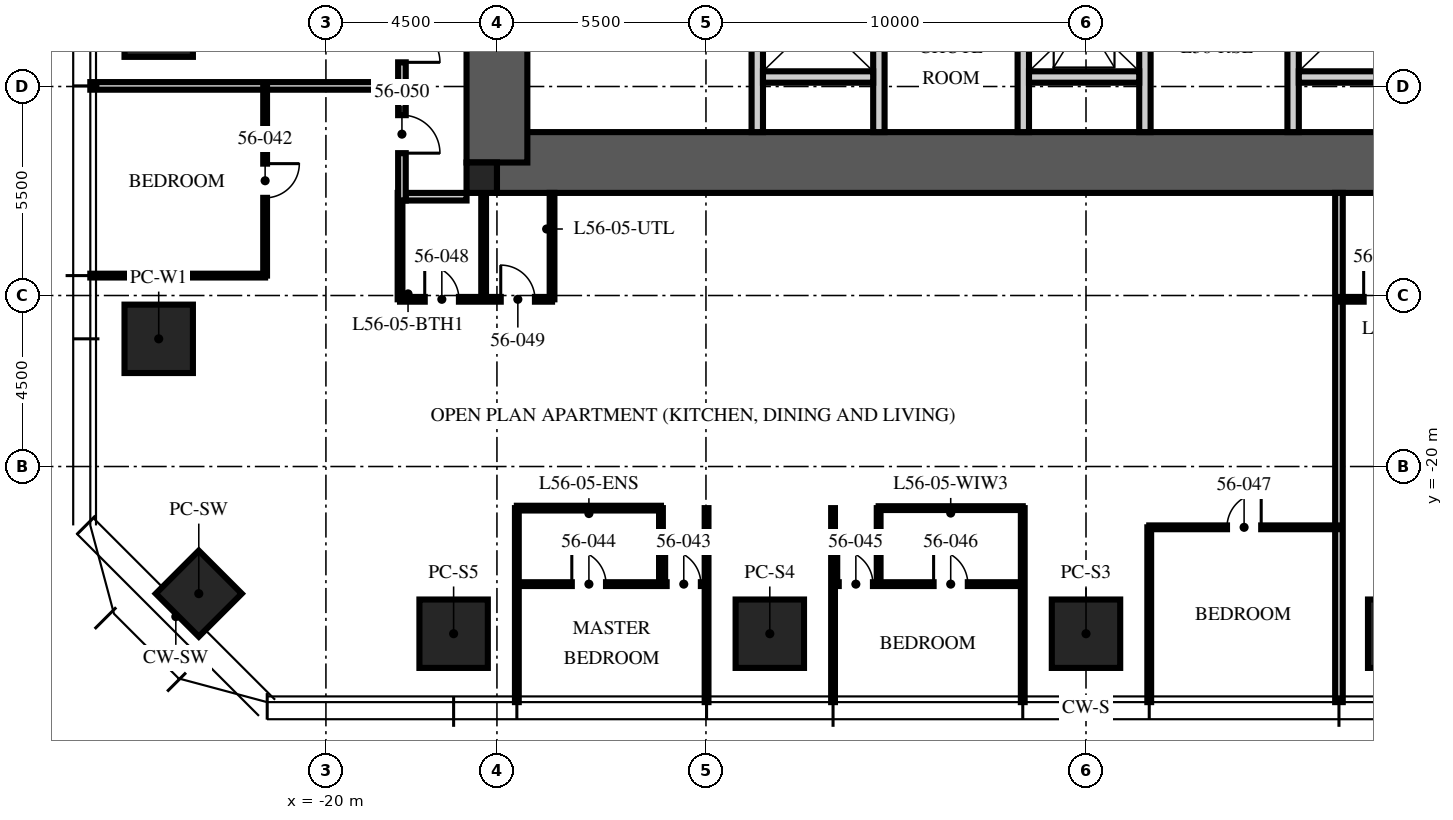
"""IFC4 building model, lengths in metres.
Left out: names, types, materials, properties, quantities, classifications, styles, units other than length and angle.
Written with IfcOpenShell. Run it as: python <this file> out.ifc"""

import sys

from ifc_helpers import new_model, si_unit, direction, frame, frame_2d, origin, origin_2d, place, context, subcontext, project, spatial, rectangle, extrude, element, fill, save


model = new_model("IFC4")
c1 = context("Model", 3, precision=1e-05, world=origin(), true_north=direction((0.0, 1.0)))
c2 = subcontext(c1, "Body", "Model", "MODEL_VIEW")
j1 = project(units=[si_unit("LENGTHUNIT", "METRE"), si_unit("PLANEANGLEUNIT", "RADIAN")], contexts=[c1])
p1 = place(None, origin())
s1 = spatial("IfcSite", under=j1, at=p1, CompositionType="ELEMENT")
p2 = place(p1, origin())
s2 = spatial("IfcBuilding", under=s1, at=p2, CompositionType="ELEMENT")
p3 = place(p2, frame((0.0, 0.0, 225.75)))
s3 = spatial("IfcBuildingStorey", under=s2, at=p3, CompositionType="ELEMENT", Elevation=225.75)
p4 = place(p3, frame((-15.5, -12.0, -0.25), z_axis=(0.0, 0.0, 1.0), x_axis=(1.0, 0.0, 0.0)))
e1 = element("IfcWall", 1, at=p4, inside=s3, PredefinedType="SHEAR", context=c2, shape_type="SweptSolid", body=[
    extrude(rectangle(XDim=31.0, YDim=1.6, at=frame_2d((15.5, 0.0))), origin(), (0.0, 0.0, 1.0), 3.75),
])
p5 = place(p3, frame((-15.5, -12.0, -0.25), z_axis=(0.0, 0.0, 1.0), x_axis=(0.0, 1.0, 0.0)))
e2 = element("IfcWall", 2, at=p5, inside=s3, PredefinedType="SHEAR", context=c2, shape_type="SweptSolid", body=[
    extrude(rectangle(XDim=24.0, YDim=1.6, at=frame_2d((12.0, 0.0))), origin(), (0.0, 0.0, 1.0), 3.75),
])
p6 = place(p5, frame((3.2, 0.0, 0.25)))
e3 = element("IfcOpeningElement", 3, at=p6, cuts=e2, PredefinedType="OPENING", context=c2, shape_type="SweptSolid", body=[
    extrude(rectangle(XDim=1.2, YDim=2.1, at=frame_2d((0.6, 1.05))), frame((0.0, 0.81, 0.0), z_axis=(0.0, -1.0, 0.0), x_axis=(1.0, 0.0, 0.0)), (0.0, 0.0, 1.0), 1.62),
])
p7 = place(p5, frame((19.3, 0.0, 0.25)))
e4 = element("IfcOpeningElement", 4, at=p7, cuts=e2, PredefinedType="OPENING", context=c2, shape_type="SweptSolid", body=[
    extrude(rectangle(XDim=1.8, YDim=2.1, at=frame_2d((0.9, 1.05))), frame((0.0, 0.81, 0.0), z_axis=(0.0, -1.0, 0.0), x_axis=(1.0, 0.0, 0.0)), (0.0, 0.0, 1.0), 1.62),
])
p8 = place(p3, frame((-15.9, -12.4, -0.25), z_axis=(0.0, 0.0, 1.0), x_axis=(1.0, 0.0, 0.0)))
e5 = element("IfcColumn", 5, at=p8, inside=s3, PredefinedType="COLUMN", context=c2, shape_type="SweptSolid", body=[
    extrude(rectangle(XDim=0.8, YDim=0.8, at=origin_2d()), origin(), (0.0, 0.0, 1.0), 3.75),
])
for number, where, z_axis, x_axis in (
    (6, (8.32, -24.4, 0.0), (0.0, 0.0, 1.0), (1.0, 0.0, 0.0)),
    (7, (0.0, -24.4, 0.0), (0.0, 0.0, 1.0), (1.0, 0.0, 0.0)),
    (8, (-8.32, -24.4, 0.0), (0.0, 0.0, 1.0), (1.0, 0.0, 0.0)),
    (9, (-16.64, -24.4, 0.0), (0.0, 0.0, 1.0), (1.0, 0.0, 0.0)),
    (10, (-24.4, -16.64, 0.0), (0.0, 0.0, 1.0), (0.0, 1.0, 0.0)),
    (11, (-24.4, -8.32, 0.0), (0.0, 0.0, 1.0), (0.0, 1.0, 0.0)),
):
    element("IfcColumn", number, at=place(p3, frame(where, z_axis=z_axis, x_axis=x_axis)), inside=s3, PredefinedType="COLUMN", context=c2, shape_type="SweptSolid", body=[
        extrude(rectangle(XDim=1.8, YDim=1.8, at=origin_2d()), origin(), (0.0, 0.0, 1.0), 3.75),
    ])
p9 = place(p3, frame((-23.346, -23.346, 0.0), z_axis=(0.0, 0.0, 1.0), x_axis=(0.707106781187, -0.707106781187, 0.0)))
e12 = element("IfcColumn", 12, at=p9, inside=s3, PredefinedType="COLUMN", context=c2, shape_type="SweptSolid", body=[
    extrude(rectangle(XDim=1.6, YDim=1.6, at=origin_2d()), origin(), (0.0, 0.0, 1.0), 3.75),
])
p10 = place(p3, frame((-8.65, -11.2, 0.0), z_axis=(0.0, 0.0, 1.0), x_axis=(0.0, 1.0, 0.0)))
e13 = element("IfcWall", 13, at=p10, inside=s3, PredefinedType="PARTITIONING", context=c2, shape_type="SweptSolid", body=[
    extrude(rectangle(XDim=6.3, YDim=0.3, at=frame_2d((3.15, 0.0))), origin(), (0.0, 0.0, 1.0), 3.5),
])
p11 = place(p10, frame((2.45, 0.0, 0.0)))
e14 = element("IfcOpeningElement", 14, at=p11, cuts=e13, PredefinedType="OPENING", context=c2, shape_type="SweptSolid", body=[
    extrude(rectangle(XDim=1.1, YDim=2.1, at=frame_2d((0.55, 1.05))), frame((0.0, 0.16, 0.0), z_axis=(0.0, -1.0, 0.0), x_axis=(1.0, 0.0, 0.0)), (0.0, 0.0, 1.0), 0.32),
])
for number, where, z_axis, x_axis in (
    (15, (-5.45, -11.2, 0.0), (0.0, 0.0, 1.0), (0.0, 1.0, 0.0)),
    (16, (-1.65, -11.2, 0.0), (0.0, 0.0, 1.0), (0.0, 1.0, 0.0)),
    (17, (1.55, -11.2, 0.0), (0.0, 0.0, 1.0), (0.0, 1.0, 0.0)),
    (18, (5.45, -11.2, 0.0), (0.0, 0.0, 1.0), (0.0, 1.0, 0.0)),
):
    element("IfcWall", number, at=place(p3, frame(where, z_axis=z_axis, x_axis=x_axis)), inside=s3, PredefinedType="PARTITIONING", context=c2, shape_type="SweptSolid", body=[
        extrude(rectangle(XDim=4.4, YDim=0.3, at=frame_2d((2.2, 0.0))), origin(), (0.0, 0.0, 1.0), 3.5),
    ])
for number, where, z_axis, x_axis in (
    (19, (-8.5, -9.75, 0.0), (0.0, 0.0, 1.0), (1.0, 0.0, 0.0)),
    (20, (-1.5, -9.75, 0.0), (0.0, 0.0, 1.0), (1.0, 0.0, 0.0)),
    (21, (5.6, -9.75, 0.0), (0.0, 0.0, 1.0), (1.0, 0.0, 0.0)),
):
    element("IfcWall", number, at=place(p3, frame(where, z_axis=z_axis, x_axis=x_axis)), inside=s3, PredefinedType="PARTITIONING", context=c2, shape_type="SweptSolid", body=[
        extrude(rectangle(XDim=2.9, YDim=0.3, at=frame_2d((1.45, 0.0))), origin(), (0.0, 0.0, 1.0), 3.5),
    ])
p12 = place(p3, frame((-16.3, -12.9, 0.0), z_axis=(0.0, 0.0, 1.0), x_axis=(-1.0, 0.0, 0.0)))
e22 = element("IfcWall", 22, at=p12, inside=s3, PredefinedType="PARTITIONING", context=c2, shape_type="SweptSolid", body=[
    extrude(rectangle(XDim=1.6, YDim=0.2, at=frame_2d((0.8, 0.0))), origin(), (0.0, 0.0, 1.0), 2.3),
])
p13 = place(p3, frame((-18.1, -9.984, 0.0), z_axis=(0.0, 0.0, 1.0), x_axis=(-1.0, 0.0, 0.0)))
e23 = element("IfcWall", 23, at=p13, inside=s3, PredefinedType="PARTITIONING", context=c2, shape_type="SweptSolid", body=[
    extrude(rectangle(XDim=8.1, YDim=0.2, at=frame_2d((4.05, 0.0))), origin(), (0.0, 0.0, 1.0), 2.91),
])
p14 = place(p3, frame((-21.6, -14.976, 0.0), z_axis=(0.0, 0.0, 1.0), x_axis=(-1.0, 0.0, 0.0)))
e24 = element("IfcWall", 24, at=p14, inside=s3, PredefinedType="PARTITIONING", context=c2, shape_type="SweptSolid", body=[
    extrude(rectangle(XDim=4.6, YDim=0.1, at=frame_2d((2.3, 0.0))), origin(), (0.0, 0.0, 1.0), 2.91),
])
for number, where, z_axis, x_axis in (
    (25, (-14.976, -21.095, 0.0), (0.0, 0.0, 1.0), (0.0, -1.0, 0.0)),
    (26, (-9.984, -21.095, 0.0), (0.0, 0.0, 1.0), (0.0, -1.0, 0.0)),
    (27, (-6.656, -21.095, 0.0), (0.0, 0.0, 1.0), (0.0, -1.0, 0.0)),
    (28, (-1.664, -21.095, 0.0), (0.0, 0.0, 1.0), (0.0, -1.0, 0.0)),
):
    element("IfcWall", number, at=place(p3, frame(where, z_axis=z_axis, x_axis=x_axis)), inside=s3, PredefinedType="PARTITIONING", context=c2, shape_type="SweptSolid", body=[
        extrude(rectangle(XDim=5.105, YDim=0.1, at=frame_2d((2.552, 0.0))), origin(), (0.0, 0.0, 1.0), 2.91),
    ])
p15 = place(p3, frame((1.664, -21.6, 0.0), z_axis=(0.0, 0.0, 1.0), x_axis=(0.0, -1.0, 0.0)))
e29 = element("IfcWall", 29, at=p15, inside=s3, PredefinedType="PARTITIONING", context=c2, shape_type="SweptSolid", body=[
    extrude(rectangle(XDim=4.6, YDim=0.1, at=frame_2d((2.3, 0.0))), origin(), (0.0, 0.0, 1.0), 2.91),
])
p16 = place(p3, frame((6.656, -12.8, 0.0), z_axis=(0.0, 0.0, 1.0), x_axis=(0.0, -1.0, 0.0)))
e30 = element("IfcWall", 30, at=p16, inside=s3, PredefinedType="PARTITIONING", context=c2, shape_type="SweptSolid", body=[
    extrude(rectangle(XDim=13.4, YDim=0.2, at=frame_2d((6.7, 0.0))), origin(), (0.0, 0.0, 1.0), 2.91),
])
p17 = place(p3, frame((-21.6, -9.984, 0.0), z_axis=(0.0, 0.0, 1.0), x_axis=(0.0, -1.0, 0.0)))
e31 = element("IfcWall", 31, at=p17, inside=s3, PredefinedType="PARTITIONING", context=c2, shape_type="SweptSolid", body=[
    extrude(rectangle(XDim=4.992, YDim=0.1, at=frame_2d((2.496, 0.0))), origin(), (0.0, 0.0, 1.0), 2.81),
])
p18 = place(p17, frame((2.046, 0.0, 0.0)))
e32 = element("IfcOpeningElement", 32, at=p18, cuts=e31, PredefinedType="OPENING", context=c2, shape_type="SweptSolid", body=[
    extrude(rectangle(XDim=0.9, YDim=2.1, at=frame_2d((0.45, 1.05))), frame((0.0, 0.06, 0.0), z_axis=(0.0, -1.0, 0.0), x_axis=(1.0, 0.0, 0.0)), (0.0, 0.0, 1.0), 0.12),
])
p19 = place(p3, frame((-14.976, -23.095, 0.0), z_axis=(0.0, 0.0, 1.0), x_axis=(1.0, 0.0, 0.0)))
e33 = element("IfcWall", 33, at=p19, inside=s3, PredefinedType="PARTITIONING", context=c2, shape_type="SweptSolid", body=[
    extrude(rectangle(XDim=4.992, YDim=0.1, at=frame_2d((2.496, 0.0))), origin(), (0.0, 0.0, 1.0), 2.81),
])
p20 = place(p19, frame((3.942, 0.0, 0.0)))
e34 = element("IfcOpeningElement", 34, at=p20, cuts=e33, PredefinedType="OPENING", context=c2, shape_type="SweptSolid", body=[
    extrude(rectangle(XDim=0.9, YDim=2.1, at=frame_2d((0.45, 1.05))), frame((0.0, 0.06, 0.0), z_axis=(0.0, -1.0, 0.0), x_axis=(1.0, 0.0, 0.0)), (0.0, 0.0, 1.0), 0.12),
])
p21 = place(p19, frame((1.446, 0.0, 0.0)))
e35 = element("IfcOpeningElement", 35, at=p21, cuts=e33, PredefinedType="OPENING", context=c2, shape_type="SweptSolid", body=[
    extrude(rectangle(XDim=0.9, YDim=2.1, at=frame_2d((0.45, 1.05))), frame((0.0, 0.06, 0.0), z_axis=(0.0, -1.0, 0.0), x_axis=(1.0, 0.0, 0.0)), (0.0, 0.0, 1.0), 0.12),
])
p22 = place(p3, frame((-11.184, -21.095, 0.0), z_axis=(0.0, 0.0, 1.0), x_axis=(0.0, -1.0, 0.0)))
e36 = element("IfcWall", 36, at=p22, inside=s3, PredefinedType="PARTITIONING", context=c2, shape_type="SweptSolid", body=[
    extrude(rectangle(XDim=2.0, YDim=0.1, at=frame_2d((1.0, 0.0))), origin(), (0.0, 0.0, 1.0), 3.5),
])
p23 = place(p3, frame((-14.976, -21.095, 0.0), z_axis=(0.0, 0.0, 1.0), x_axis=(1.0, 0.0, 0.0)))
e37 = element("IfcWall", 37, at=p23, inside=s3, PredefinedType="PARTITIONING", context=c2, shape_type="SweptSolid", body=[
    extrude(rectangle(XDim=3.792, YDim=0.125, at=frame_2d((1.896, 0.0))), origin(), (0.0, 0.0, 1.0), 2.81),
])
p24 = place(p3, frame((-6.656, -23.095, 0.0), z_axis=(0.0, 0.0, 1.0), x_axis=(1.0, 0.0, 0.0)))
e38 = element("IfcWall", 38, at=p24, inside=s3, PredefinedType="PARTITIONING", context=c2, shape_type="SweptSolid", body=[
    extrude(rectangle(XDim=4.992, YDim=0.1, at=frame_2d((2.496, 0.0))), origin(), (0.0, 0.0, 1.0), 2.81),
])
p25 = place(p24, frame((0.15, 0.0, 0.0)))
e39 = element("IfcOpeningElement", 39, at=p25, cuts=e38, PredefinedType="OPENING", context=c2, shape_type="SweptSolid", body=[
    extrude(rectangle(XDim=0.9, YDim=2.1, at=frame_2d((0.45, 1.05))), frame((0.0, 0.06, 0.0), z_axis=(0.0, -1.0, 0.0), x_axis=(1.0, 0.0, 0.0)), (0.0, 0.0, 1.0), 0.12),
])
p26 = place(p24, frame((2.646, 0.0, 0.0)))
e40 = element("IfcOpeningElement", 40, at=p26, cuts=e38, PredefinedType="OPENING", context=c2, shape_type="SweptSolid", body=[
    extrude(rectangle(XDim=0.9, YDim=2.1, at=frame_2d((0.45, 1.05))), frame((0.0, 0.06, 0.0), z_axis=(0.0, -1.0, 0.0), x_axis=(1.0, 0.0, 0.0)), (0.0, 0.0, 1.0), 0.12),
])
p27 = place(p3, frame((-5.456, -21.095, 0.0), z_axis=(0.0, 0.0, 1.0), x_axis=(0.0, -1.0, 0.0)))
e41 = element("IfcWall", 41, at=p27, inside=s3, PredefinedType="PARTITIONING", context=c2, shape_type="SweptSolid", body=[
    extrude(rectangle(XDim=2.0, YDim=0.1, at=frame_2d((1.0, 0.0))), origin(), (0.0, 0.0, 1.0), 3.5),
])
p28 = place(p3, frame((-5.456, -21.095, 0.0), z_axis=(0.0, 0.0, 1.0), x_axis=(1.0, 0.0, 0.0)))
e42 = element("IfcWall", 42, at=p28, inside=s3, PredefinedType="PARTITIONING", context=c2, shape_type="SweptSolid", body=[
    extrude(rectangle(XDim=3.792, YDim=0.1, at=frame_2d((1.896, 0.0))), origin(), (0.0, 0.0, 1.0), 2.81),
])
p29 = place(p3, frame((1.664, -21.6, 0.0), z_axis=(0.0, 0.0, 1.0), x_axis=(1.0, 0.0, 0.0)))
e43 = element("IfcWall", 43, at=p29, inside=s3, PredefinedType="PARTITIONING", context=c2, shape_type="SweptSolid", body=[
    extrude(rectangle(XDim=4.992, YDim=0.1, at=frame_2d((2.496, 0.0))), origin(), (0.0, 0.0, 1.0), 2.81),
])
p30 = place(p29, frame((2.046, 0.0, 0.0)))
e44 = element("IfcOpeningElement", 44, at=p30, cuts=e43, PredefinedType="OPENING", context=c2, shape_type="SweptSolid", body=[
    extrude(rectangle(XDim=0.9, YDim=2.1, at=frame_2d((0.45, 1.05))), frame((0.0, 0.06, 0.0), z_axis=(0.0, -1.0, 0.0), x_axis=(1.0, 0.0, 0.0)), (0.0, 0.0, 1.0), 0.12),
])
p31 = place(p3, frame((-18.05, -15.6, 0.0), z_axis=(0.0, 0.0, 1.0), x_axis=(1.0, 0.0, 0.0)))
e45 = element("IfcWall", 45, at=p31, inside=s3, PredefinedType="PARTITIONING", context=c2, shape_type="SweptSolid", body=[
    extrude(rectangle(XDim=4.0, YDim=0.125, at=frame_2d((2.0, 0.0))), origin(), (0.0, 0.0, 1.0), 2.3),
])
p32 = place(p31, frame((0.65, 0.0, 0.0)))
e46 = element("IfcOpeningElement", 46, at=p32, cuts=e45, PredefinedType="OPENING", context=c2, shape_type="SweptSolid", body=[
    extrude(rectangle(XDim=0.9, YDim=2.1, at=frame_2d((0.45, 1.05))), frame((0.0, 0.073, 0.0), z_axis=(0.0, -1.0, 0.0), x_axis=(1.0, 0.0, 0.0)), (0.0, 0.0, 1.0), 0.145),
])
p33 = place(p31, frame((2.65, 0.0, 0.0)))
e47 = element("IfcOpeningElement", 47, at=p33, cuts=e45, PredefinedType="OPENING", context=c2, shape_type="SweptSolid", body=[
    extrude(rectangle(XDim=0.9, YDim=2.1, at=frame_2d((0.45, 1.05))), frame((0.0, 0.073, 0.0), z_axis=(0.0, -1.0, 0.0), x_axis=(1.0, 0.0, 0.0)), (0.0, 0.0, 1.0), 0.145),
])
for number, where, z_axis, x_axis in (
    (48, (-18.05, -12.8, 0.0), (0.0, 0.0, 1.0), (0.0, -1.0, 0.0)),
    (49, (-15.85, -12.8, 0.0), (0.0, 0.0, 1.0), (0.0, -1.0, 0.0)),
):
    element("IfcWall", number, at=place(p3, frame(where, z_axis=z_axis, x_axis=x_axis)), inside=s3, PredefinedType="PARTITIONING", context=c2, shape_type="SweptSolid", body=[
        extrude(rectangle(XDim=2.8, YDim=0.125, at=frame_2d((1.4, 0.0))), origin(), (0.0, 0.0, 1.0), 2.3),
    ])
p34 = place(p3, frame((-14.05, -12.8, 0.0), z_axis=(0.0, 0.0, 1.0), x_axis=(0.0, -1.0, 0.0)))
e50 = element("IfcWall", 50, at=p34, inside=s3, PredefinedType="PARTITIONING", context=c2, shape_type="SweptSolid", body=[
    extrude(rectangle(XDim=2.8, YDim=0.125, at=frame_2d((1.4, 0.0))), origin(), (0.0, 0.0, 1.0), 3.5),
])
p35 = place(p3, frame((6.656, -15.6, 0.0), z_axis=(0.0, 0.0, 1.0), x_axis=(1.0, 0.0, 0.0)))
e51 = element("IfcWall", 51, at=p35, inside=s3, PredefinedType="PARTITIONING", context=c2, shape_type="SweptSolid", body=[
    extrude(rectangle(XDim=2.2, YDim=0.125, at=frame_2d((1.1, 0.0))), origin(), (0.0, 0.0, 1.0), 2.6),
])
p36 = place(p35, frame((0.65, 0.0, 0.0)))
e52 = element("IfcOpeningElement", 52, at=p36, cuts=e51, PredefinedType="OPENING", context=c2, shape_type="SweptSolid", body=[
    extrude(rectangle(XDim=0.9, YDim=2.1, at=frame_2d((0.45, 1.05))), frame((0.0, 0.073, 0.0), z_axis=(0.0, -1.0, 0.0), x_axis=(1.0, 0.0, 0.0)), (0.0, 0.0, 1.0), 0.145),
])
p37 = place(p3, frame((-18.0, 13.0, 0.0), z_axis=(0.0, 0.0, 1.0), x_axis=(0.0, -1.0, 0.0)))
e53 = element("IfcWall", 53, at=p37, inside=s3, PredefinedType="PARTITIONING", context=c2, shape_type="SweptSolid", body=[
    extrude(rectangle(XDim=26.0, YDim=0.2, at=frame_2d((13.0, 0.0))), origin(), (0.0, 0.0, 1.0), 2.6),
])
p38 = place(p37, frame((4.6, 0.0, 0.0)))
e54 = element("IfcOpeningElement", 54, at=p38, cuts=e53, PredefinedType="OPENING", context=c2, shape_type="SweptSolid", body=[
    extrude(rectangle(XDim=1.0, YDim=2.2, at=frame_2d((0.5, 1.1))), frame((0.0, 0.11, 0.0), z_axis=(0.0, -1.0, 0.0), x_axis=(1.0, 0.0, 0.0)), (0.0, 0.0, 1.0), 0.22),
])
p39 = place(p37, frame((21.364, 0.0, 0.0)))
e55 = element("IfcOpeningElement", 55, at=p39, cuts=e53, PredefinedType="OPENING", context=c2, shape_type="SweptSolid", body=[
    extrude(rectangle(XDim=1.0, YDim=2.2, at=frame_2d((0.5, 1.1))), frame((0.0, 0.11, 0.0), z_axis=(0.0, -1.0, 0.0), x_axis=(1.0, 0.0, 0.0)), (0.0, 0.0, 1.0), 0.22),
])
p40 = place(p37, frame((23.754, 0.0, 0.0)))
e56 = element("IfcOpeningElement", 56, at=p40, cuts=e53, PredefinedType="OPENING", context=c2, shape_type="SweptSolid", body=[
    extrude(rectangle(XDim=1.0, YDim=2.2, at=frame_2d((0.5, 1.1))), frame((0.0, 0.11, 0.0), z_axis=(0.0, -1.0, 0.0), x_axis=(1.0, 0.0, 0.0)), (0.0, 0.0, 1.0), 0.22),
])
p41 = place(p39, origin())
e57 = element("IfcDoor", 57, at=p41, inside=s3, OperationType="SINGLE_SWING_RIGHT", PredefinedType="DOOR", context=c2, shape_type="SweptSolid", body=[
    extrude(rectangle(XDim=1.0, YDim=2.2, at=frame_2d((0.5, 1.1))), frame((0.0, 0.025, 0.0), z_axis=(0.0, -1.0, 0.0), x_axis=(1.0, 0.0, 0.0)), (0.0, 0.0, 1.0), 0.05),
])
fill(e55, e57)
p42 = place(p18, origin())
e58 = element("IfcDoor", 58, at=p42, inside=s3, OperationType="SINGLE_SWING_LEFT", PredefinedType="DOOR", context=c2, shape_type="SweptSolid", body=[
    extrude(rectangle(XDim=0.9, YDim=2.1, at=frame_2d((0.45, 1.05))), frame((0.0, 0.025, 0.0), z_axis=(0.0, -1.0, 0.0), x_axis=(1.0, 0.0, 0.0)), (0.0, 0.0, 1.0), 0.05),
])
fill(e32, e58)
p43 = place(p20, origin())
e59 = element("IfcDoor", 59, at=p43, inside=s3, OperationType="SINGLE_SWING_LEFT", PredefinedType="DOOR", context=c2, shape_type="SweptSolid", body=[
    extrude(rectangle(XDim=0.9, YDim=2.1, at=frame_2d((0.45, 1.05))), frame((0.0, 0.025, 0.0), z_axis=(0.0, -1.0, 0.0), x_axis=(1.0, 0.0, 0.0)), (0.0, 0.0, 1.0), 0.05),
])
fill(e34, e59)
p44 = place(p21, origin())
e60 = element("IfcDoor", 60, at=p44, inside=s3, OperationType="SINGLE_SWING_LEFT", PredefinedType="DOOR", context=c2, shape_type="SweptSolid", body=[
    extrude(rectangle(XDim=0.9, YDim=2.1, at=frame_2d((0.45, 1.05))), frame((0.0, 0.025, 0.0), z_axis=(0.0, -1.0, 0.0), x_axis=(1.0, 0.0, 0.0)), (0.0, 0.0, 1.0), 0.05),
])
fill(e35, e60)
p45 = place(p25, origin())
e61 = element("IfcDoor", 61, at=p45, inside=s3, OperationType="SINGLE_SWING_LEFT", PredefinedType="DOOR", context=c2, shape_type="SweptSolid", body=[
    extrude(rectangle(XDim=0.9, YDim=2.1, at=frame_2d((0.45, 1.05))), frame((0.0, 0.025, 0.0), z_axis=(0.0, -1.0, 0.0), x_axis=(1.0, 0.0, 0.0)), (0.0, 0.0, 1.0), 0.05),
])
fill(e39, e61)
p46 = place(p26, origin())
e62 = element("IfcDoor", 62, at=p46, inside=s3, OperationType="SINGLE_SWING_LEFT", PredefinedType="DOOR", context=c2, shape_type="SweptSolid", body=[
    extrude(rectangle(XDim=0.9, YDim=2.1, at=frame_2d((0.45, 1.05))), frame((0.0, 0.025, 0.0), z_axis=(0.0, -1.0, 0.0), x_axis=(1.0, 0.0, 0.0)), (0.0, 0.0, 1.0), 0.05),
])
fill(e40, e62)
p47 = place(p30, origin())
e63 = element("IfcDoor", 63, at=p47, inside=s3, OperationType="SINGLE_SWING_RIGHT", PredefinedType="DOOR", context=c2, shape_type="SweptSolid", body=[
    extrude(rectangle(XDim=0.9, YDim=2.1, at=frame_2d((0.45, 1.05))), frame((0.0, 0.025, 0.0), z_axis=(0.0, -1.0, 0.0), x_axis=(1.0, 0.0, 0.0)), (0.0, 0.0, 1.0), 0.05),
])
fill(e44, e63)
p48 = place(p32, origin())
e64 = element("IfcDoor", 64, at=p48, inside=s3, OperationType="SINGLE_SWING_LEFT", PredefinedType="DOOR", context=c2, shape_type="SweptSolid", body=[
    extrude(rectangle(XDim=0.9, YDim=2.1, at=frame_2d((0.45, 1.05))), frame((0.0, 0.025, 0.0), z_axis=(0.0, -1.0, 0.0), x_axis=(1.0, 0.0, 0.0)), (0.0, 0.0, 1.0), 0.05),
])
fill(e46, e64)
p49 = place(p33, origin())
e65 = element("IfcDoor", 65, at=p49, inside=s3, OperationType="SINGLE_SWING_LEFT", PredefinedType="DOOR", context=c2, shape_type="SweptSolid", body=[
    extrude(rectangle(XDim=0.9, YDim=2.1, at=frame_2d((0.45, 1.05))), frame((0.0, 0.025, 0.0), z_axis=(0.0, -1.0, 0.0), x_axis=(1.0, 0.0, 0.0)), (0.0, 0.0, 1.0), 0.05),
])
fill(e47, e65)
p50 = place(p40, origin())
e66 = element("IfcDoor", 66, at=p50, inside=s3, OperationType="SINGLE_SWING_RIGHT", PredefinedType="DOOR", context=c2, shape_type="SweptSolid", body=[
    extrude(rectangle(XDim=1.0, YDim=2.2, at=frame_2d((0.5, 1.1))), frame((0.0, 0.025, 0.0), z_axis=(0.0, -1.0, 0.0), x_axis=(1.0, 0.0, 0.0)), (0.0, 0.0, 1.0), 0.05),
])
fill(e56, e66)
p51 = place(p36, origin())
e67 = element("IfcDoor", 67, at=p51, inside=s3, OperationType="SINGLE_SWING_LEFT", PredefinedType="DOOR", context=c2, shape_type="SweptSolid", body=[
    extrude(rectangle(XDim=0.9, YDim=2.1, at=frame_2d((0.45, 1.05))), frame((0.0, 0.025, 0.0), z_axis=(0.0, -1.0, 0.0), x_axis=(1.0, 0.0, 0.0)), (0.0, 0.0, 1.0), 0.05),
])
fill(e52, e67)
save(model, sys.argv[1])
